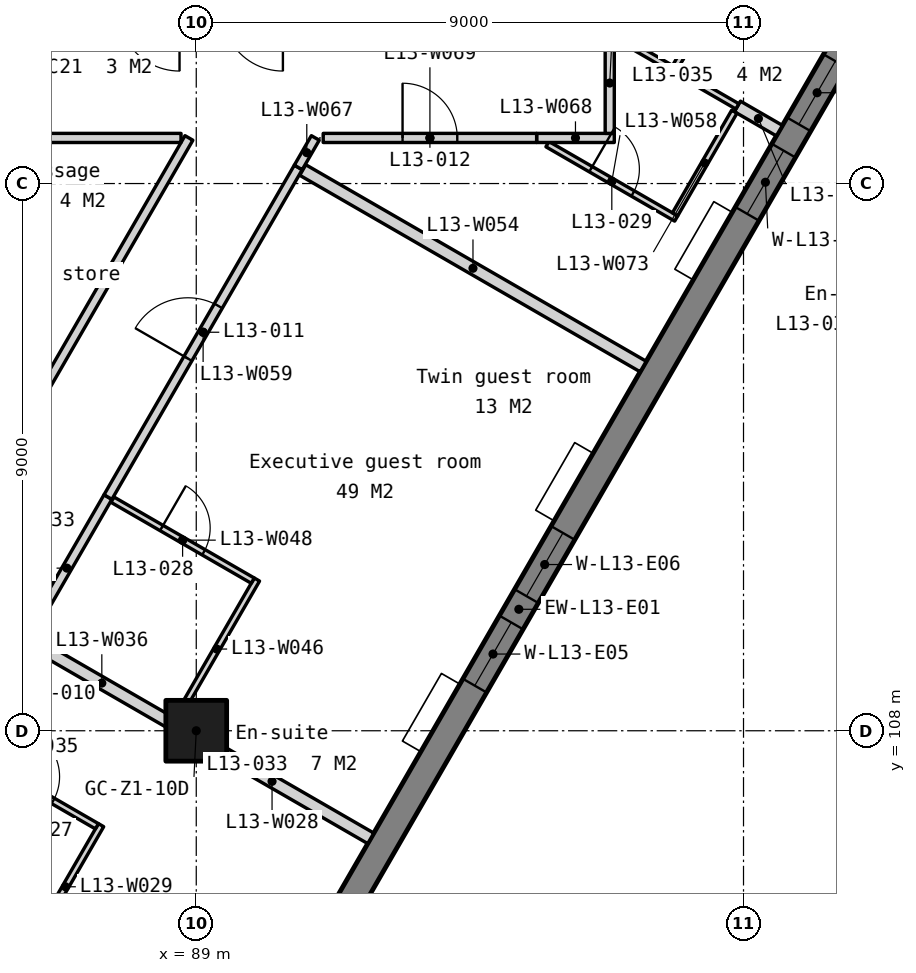
"""IFC4 building model, lengths in metres.
Left out: names, types, materials, properties, quantities, classifications, styles, units other than length and angle.
Written with IfcOpenShell. Run it as: python <this file> out.ifc"""

import sys

from ifc_helpers import new_model, si_unit, direction, frame, frame_2d, origin, origin_2d, place, context, subcontext, project, spatial, polyline, rectangle, outline, extrude, element, fill, save


model = new_model("IFC4")
c1 = context("Model", 3, precision=1e-05, world=origin(), true_north=direction((0.0, 1.0)))
c2 = subcontext(c1, "Body", "Model", "MODEL_VIEW")
j1 = project(units=[si_unit("LENGTHUNIT", "METRE"), si_unit("PLANEANGLEUNIT", "RADIAN")], contexts=[c1])
p1 = place(None, origin())
s1 = spatial("IfcSite", under=j1, at=p1, CompositionType="ELEMENT")
p2 = place(p1, origin())
s2 = spatial("IfcBuilding", under=s1, at=p2, CompositionType="ELEMENT")
p3 = place(p2, frame((0.0, 0.0, 59.5)))
s3 = spatial("IfcBuildingStorey", under=s2, at=p3, CompositionType="ELEMENT", Elevation=59.5)
p4 = place(p3, frame((89.0, 108.0, 0.0), z_axis=(0.0, 0.0, 1.0), x_axis=(1.0, 0.0, 0.0)))
e1 = element("IfcColumn", 1, at=p4, inside=s3, PredefinedType="COLUMN", context=c2, shape_type="SweptSolid", body=[
    extrude(rectangle(XDim=1.0, YDim=1.0, at=origin_2d()), origin(), (0.0, 0.0, 1.0), 3.5),
])
p5 = place(p3, frame((83.105, 90.599, -0.15), z_axis=(0.0, 0.0, 1.0), x_axis=(0.499999201451, 0.866025864826, 0.0)))
e2 = element("IfcWall", 2, at=p5, inside=s3, PredefinedType="SOLIDWALL", context=c2, shape_type="SweptSolid", body=[
    extrude(outline(polyline([(44.8, 0.0), (44.8, 3.5), (0.0, 3.5), (0.0, 0.0), (44.8, 0.0)])), frame((0.0, 0.225, 0.0), z_axis=(0.0, -1.0, 0.0), x_axis=(1.0, 0.0, 0.0)), (0.0, 0.0, 1.0), 0.45),
])
p6 = place(p5, frame((3.03, 0.0, 1.05)))
e3 = element("IfcOpeningElement", 3, at=p6, cuts=e2, PredefinedType="OPENING", context=c2, shape_type="SweptSolid", body=[
    extrude(rectangle(XDim=1.2, YDim=1.5, at=frame_2d((0.6, 0.75))), frame((0.0, 0.235, 0.0), z_axis=(0.0, -1.0, 0.0), x_axis=(1.0, 0.0, 0.0)), (0.0, 0.0, 1.0), 0.47),
])
p7 = place(p5, frame((4.73, 0.0, 1.05)))
e4 = element("IfcOpeningElement", 4, at=p7, cuts=e2, PredefinedType="OPENING", context=c2, shape_type="SweptSolid", body=[
    extrude(rectangle(XDim=1.2, YDim=1.5, at=frame_2d((0.6, 0.75))), frame((0.0, 0.235, 0.0), z_axis=(0.0, -1.0, 0.0), x_axis=(1.0, 0.0, 0.0)), (0.0, 0.0, 1.0), 0.47),
])
p8 = place(p5, frame((11.99, 0.0, 1.05)))
e5 = element("IfcOpeningElement", 5, at=p8, cuts=e2, PredefinedType="OPENING", context=c2, shape_type="SweptSolid", body=[
    extrude(rectangle(XDim=1.2, YDim=1.5, at=frame_2d((0.6, 0.75))), frame((0.0, 0.235, 0.0), z_axis=(0.0, -1.0, 0.0), x_axis=(1.0, 0.0, 0.0)), (0.0, 0.0, 1.0), 0.47),
])
p9 = place(p5, frame((13.69, 0.0, 1.05)))
e6 = element("IfcOpeningElement", 6, at=p9, cuts=e2, PredefinedType="OPENING", context=c2, shape_type="SweptSolid", body=[
    extrude(rectangle(XDim=1.2, YDim=1.5, at=frame_2d((0.6, 0.75))), frame((0.0, 0.235, 0.0), z_axis=(0.0, -1.0, 0.0), x_axis=(1.0, 0.0, 0.0)), (0.0, 0.0, 1.0), 0.47),
])
p10 = place(p5, frame((20.95, 0.0, 1.05)))
e7 = element("IfcOpeningElement", 7, at=p10, cuts=e2, PredefinedType="OPENING", context=c2, shape_type="SweptSolid", body=[
    extrude(rectangle(XDim=1.2, YDim=1.5, at=frame_2d((0.6, 0.75))), frame((0.0, 0.235, 0.0), z_axis=(0.0, -1.0, 0.0), x_axis=(1.0, 0.0, 0.0)), (0.0, 0.0, 1.0), 0.47),
])
p11 = place(p5, frame((22.65, 0.0, 1.05)))
e8 = element("IfcOpeningElement", 8, at=p11, cuts=e2, PredefinedType="OPENING", context=c2, shape_type="SweptSolid", body=[
    extrude(rectangle(XDim=1.2, YDim=1.5, at=frame_2d((0.6, 0.75))), frame((0.0, 0.235, 0.0), z_axis=(0.0, -1.0, 0.0), x_axis=(1.0, 0.0, 0.0)), (0.0, 0.0, 1.0), 0.47),
])
p12 = place(p5, frame((29.91, 0.0, 1.05)))
e9 = element("IfcOpeningElement", 9, at=p12, cuts=e2, PredefinedType="OPENING", context=c2, shape_type="SweptSolid", body=[
    extrude(rectangle(XDim=1.2, YDim=1.5, at=frame_2d((0.6, 0.75))), frame((0.0, 0.235, 0.0), z_axis=(0.0, -1.0, 0.0), x_axis=(1.0, 0.0, 0.0)), (0.0, 0.0, 1.0), 0.47),
])
p13 = place(p5, frame((31.61, 0.0, 1.05)))
e10 = element("IfcOpeningElement", 10, at=p13, cuts=e2, PredefinedType="OPENING", context=c2, shape_type="SweptSolid", body=[
    extrude(rectangle(XDim=1.2, YDim=1.5, at=frame_2d((0.6, 0.75))), frame((0.0, 0.235, 0.0), z_axis=(0.0, -1.0, 0.0), x_axis=(1.0, 0.0, 0.0)), (0.0, 0.0, 1.0), 0.47),
])
p14 = place(p5, frame((38.87, 0.0, 1.05)))
e11 = element("IfcOpeningElement", 11, at=p14, cuts=e2, PredefinedType="OPENING", context=c2, shape_type="SweptSolid", body=[
    extrude(rectangle(XDim=1.2, YDim=1.5, at=frame_2d((0.6, 0.75))), frame((0.0, 0.235, 0.0), z_axis=(0.0, -1.0, 0.0), x_axis=(1.0, 0.0, 0.0)), (0.0, 0.0, 1.0), 0.47),
])
p15 = place(p5, frame((40.57, 0.0, 1.05)))
e12 = element("IfcOpeningElement", 12, at=p15, cuts=e2, PredefinedType="OPENING", context=c2, shape_type="SweptSolid", body=[
    extrude(rectangle(XDim=1.2, YDim=1.5, at=frame_2d((0.6, 0.75))), frame((0.0, 0.235, 0.0), z_axis=(0.0, -1.0, 0.0), x_axis=(1.0, 0.0, 0.0)), (0.0, 0.0, 1.0), 0.47),
])
p16 = place(p3, frame((84.031, 105.583, 0.0), z_axis=(0.0, 0.0, 1.0), x_axis=(0.866015162859, -0.500017737384, 0.0)))
e13 = element("IfcWall", 13, at=p16, inside=s3, PredefinedType="PARTITIONING", context=c2, shape_type="SweptSolid", body=[
    extrude(rectangle(XDim=6.465, YDim=0.2, at=frame_2d((3.232, 0.0))), origin(), (0.0, 0.0, 1.0), 3.35),
])
p17 = place(p3, frame((88.623, 108.105, 0.0), z_axis=(0.0, 0.0, 1.0), x_axis=(0.866022959057, -0.500004234368, 0.0)))
e14 = element("IfcWall", 14, at=p17, inside=s3, PredefinedType="PARTITIONING", context=c2, shape_type="SweptSolid", body=[
    extrude(rectangle(XDim=3.75, YDim=0.2, at=frame_2d((1.875, 0.0))), origin(), (0.0, 0.0, 1.0), 3.35),
])
p18 = place(p3, frame((86.264, 104.421, 0.0), z_axis=(0.0, 0.0, 1.0), x_axis=(0.500032503492, 0.866006637072, 0.0)))
e15 = element("IfcWall", 15, at=p18, inside=s3, PredefinedType="PARTITIONING", context=c2, shape_type="SweptSolid", body=[
    extrude(rectangle(XDim=2.34, YDim=0.1, at=frame_2d((1.17, 0.0))), origin(), (0.0, 0.0, 1.0), 3.35),
])
p19 = place(p3, frame((82.601, 106.875, 0.0), z_axis=(0.0, 0.0, 1.0), x_axis=(0.499995104884, 0.866028229963, 0.0)))
e16 = element("IfcWall", 16, at=p19, inside=s3, PredefinedType="PARTITIONING", context=c2, shape_type="SweptSolid", body=[
    extrude(rectangle(XDim=12.557, YDim=0.15, at=frame_2d((6.278, 0.0))), origin(), (0.0, 0.0, 1.0), 3.35),
])
p20 = place(p19, frame((5.828, 0.0, 0.0)))
e17 = element("IfcOpeningElement", 17, at=p20, cuts=e16, PredefinedType="OPENING", context=c2, shape_type="SweptSolid", body=[
    extrude(rectangle(XDim=0.9, YDim=2.1, at=frame_2d((0.45, 1.05))), frame((0.0, 0.085, 0.0), z_axis=(0.0, -1.0, 0.0), x_axis=(1.0, 0.0, 0.0)), (0.0, 0.0, 1.0), 0.17),
])
p21 = place(p3, frame((85.231, 107.662, 0.0), z_axis=(0.0, 0.0, 1.0), x_axis=(0.866040446274, -0.499973944738, 0.0)))
e18 = element("IfcWall", 18, at=p21, inside=s3, PredefinedType="PARTITIONING", context=c2, shape_type="SweptSolid", body=[
    extrude(rectangle(XDim=2.465, YDim=0.1, at=frame_2d((1.232, 0.0))), origin(), (0.0, 0.0, 1.0), 3.35),
])
p22 = place(p21, frame((0.833, 0.0, 0.0)))
e19 = element("IfcOpeningElement", 19, at=p22, cuts=e18, PredefinedType="OPENING", context=c2, shape_type="SweptSolid", body=[
    extrude(rectangle(XDim=0.8, YDim=2.1, at=frame_2d((0.4, 1.05))), frame((0.0, 0.06, 0.0), z_axis=(0.0, -1.0, 0.0), x_axis=(1.0, 0.0, 0.0)), (0.0, 0.0, 1.0), 0.12),
])
p23 = place(p3, frame((86.271, 109.463, 0.0), z_axis=(0.0, 0.0, 1.0), x_axis=(0.866043331744, -0.499968946578, 0.0)))
e20 = element("IfcWall", 20, at=p23, inside=s3, PredefinedType="PARTITIONING", context=c2, shape_type="SweptSolid", body=[
    extrude(rectangle(XDim=2.715, YDim=0.2, at=frame_2d((1.357, 0.0))), origin(), (0.0, 0.0, 1.0), 3.35),
])
p24 = place(p3, frame((86.198, 109.505, 0.0), z_axis=(0.0, 0.0, 1.0), x_axis=(0.50000943426, 0.866019956843, 0.0)))
e21 = element("IfcWall", 21, at=p24, inside=s3, PredefinedType="PARTITIONING", context=c2, shape_type="SweptSolid", body=[
    extrude(rectangle(XDim=2.7, YDim=0.15, at=frame_2d((1.35, 0.0))), origin(), (0.0, 0.0, 1.0), 3.35),
])
p25 = place(p3, frame((88.678, 108.201, 0.0), z_axis=(0.0, 0.0, 1.0), x_axis=(0.500007957085, 0.86602080971, 0.0)))
e22 = element("IfcWall", 22, at=p25, inside=s3, PredefinedType="PARTITIONING", context=c2, shape_type="SweptSolid", body=[
    extrude(rectangle(XDim=2.64, YDim=0.1, at=frame_2d((1.32, 0.0))), origin(), (0.0, 0.0, 1.0), 3.35),
])
p26 = place(p3, frame((87.621, 111.801, 0.0), z_axis=(0.0, 0.0, 1.0), x_axis=(0.866036091453, -0.499981487958, 0.0)))
e23 = element("IfcWall", 23, at=p26, inside=s3, PredefinedType="PARTITIONING", context=c2, shape_type="SweptSolid", body=[
    extrude(rectangle(XDim=2.665, YDim=0.1, at=frame_2d((1.333, 0.0))), origin(), (0.0, 0.0, 1.0), 3.35),
])
p27 = place(p26, frame((0.933, 0.0, 0.0)))
e24 = element("IfcOpeningElement", 24, at=p27, cuts=e23, PredefinedType="OPENING", context=c2, shape_type="SweptSolid", body=[
    extrude(rectangle(XDim=0.8, YDim=2.1, at=frame_2d((0.4, 1.05))), frame((0.0, 0.06, 0.0), z_axis=(0.0, -1.0, 0.0), x_axis=(1.0, 0.0, 0.0)), (0.0, 0.0, 1.0), 0.12),
])
p28 = place(p3, frame((90.751, 117.223, 0.0), z_axis=(0.0, 0.0, 1.0), x_axis=(0.866015162859, -0.500017737384, 0.0)))
e25 = element("IfcWall", 25, at=p28, inside=s3, PredefinedType="PARTITIONING", context=c2, shape_type="SweptSolid", body=[
    extrude(rectangle(XDim=6.465, YDim=0.2, at=frame_2d((3.232, 0.0))), origin(), (0.0, 0.0, 1.0), 3.35),
])
p29 = place(p3, frame((94.775, 117.647, 0.0), z_axis=(0.0, 0.0, 1.0), x_axis=(0.86604092097, -0.499973122483, 0.0)))
e26 = element("IfcWall", 26, at=p29, inside=s3, PredefinedType="PARTITIONING", context=c2, shape_type="SweptSolid", body=[
    extrude(rectangle(XDim=2.445, YDim=0.1, at=frame_2d((1.223, 0.0))), origin(), (0.0, 0.0, 1.0), 3.35),
])
p30 = place(p29, frame((0.823, 0.0, 0.0)))
e27 = element("IfcOpeningElement", 27, at=p30, cuts=e26, PredefinedType="OPENING", context=c2, shape_type="SweptSolid", body=[
    extrude(rectangle(XDim=0.8, YDim=2.1, at=frame_2d((0.4, 1.05))), frame((0.0, 0.06, 0.0), z_axis=(0.0, -1.0, 0.0), x_axis=(1.0, 0.0, 0.0)), (0.0, 0.0, 1.0), 0.12),
])
p31 = place(p3, frame((87.548, 111.844, 0.0), z_axis=(0.0, 0.0, 1.0), x_axis=(0.499981277565, 0.866036212918, 0.0)))
e28 = element("IfcWall", 28, at=p31, inside=s3, PredefinedType="PARTITIONING", context=c2, shape_type="SweptSolid", body=[
    extrude(rectangle(XDim=6.26, YDim=0.15, at=frame_2d((3.13, 0.0))), origin(), (0.0, 0.0, 1.0), 3.35),
])
p32 = place(p31, frame((2.63, 0.0, 0.0)))
e29 = element("IfcOpeningElement", 29, at=p32, cuts=e28, PredefinedType="OPENING", context=c2, shape_type="SweptSolid", body=[
    extrude(rectangle(XDim=1.0, YDim=2.1, at=frame_2d((0.5, 1.05))), frame((0.0, 0.085, 0.0), z_axis=(0.0, -1.0, 0.0), x_axis=(1.0, 0.0, 0.0)), (0.0, 0.0, 1.0), 0.17),
])
p33 = place(p3, frame((82.601, 117.75, 0.0), z_axis=(0.0, 0.0, 1.0), x_axis=(1.0, 0.0, 0.0)))
e30 = element("IfcWall", 30, at=p33, inside=s3, PredefinedType="PARTITIONING", context=c2, shape_type="SweptSolid", body=[
    extrude(rectangle(XDim=6.148, YDim=0.15, at=frame_2d((3.074, 0.0))), origin(), (0.0, 0.0, 1.0), 3.35),
])
p34 = place(p3, frame((90.678, 117.265, 0.0), z_axis=(0.0, 0.0, 1.0), x_axis=(0.50012503653, 0.865953201874, 0.0)))
e31 = element("IfcWall", 31, at=p34, inside=s3, PredefinedType="PARTITIONING", context=c2, shape_type="SweptSolid", body=[
    extrude(rectangle(XDim=0.56, YDim=0.15, at=frame_2d((0.28, 0.0))), origin(), (0.0, 0.0, 1.0), 3.35),
])
p35 = place(p3, frame((94.598, 117.75, 0.0), z_axis=(0.0, 0.0, 1.0), x_axis=(1.0, 0.0, 0.0)))
e32 = element("IfcWall", 32, at=p35, inside=s3, PredefinedType="PARTITIONING", context=c2, shape_type="SweptSolid", body=[
    extrude(rectangle(XDim=1.277, YDim=0.15, at=frame_2d((0.639, 0.0))), origin(), (0.0, 0.0, 1.0), 3.35),
])
p36 = place(p3, frame((91.088, 117.75, 0.0), z_axis=(0.0, 0.0, 1.0), x_axis=(1.0, 0.0, 0.0)))
e33 = element("IfcWall", 33, at=p36, inside=s3, PredefinedType="PARTITIONING", context=c2, shape_type="SweptSolid", body=[
    extrude(rectangle(XDim=3.51, YDim=0.15, at=frame_2d((1.755, 0.0))), origin(), (0.0, 0.0, 1.0), 3.35),
])
p37 = place(p36, frame((1.305, 0.0, 0.0)))
e34 = element("IfcOpeningElement", 34, at=p37, cuts=e33, PredefinedType="OPENING", context=c2, shape_type="SweptSolid", body=[
    extrude(rectangle(XDim=0.9, YDim=2.1, at=frame_2d((0.45, 1.05))), frame((0.0, 0.085, 0.0), z_axis=(0.0, -1.0, 0.0), x_axis=(1.0, 0.0, 0.0)), (0.0, 0.0, 1.0), 0.17),
])
p38 = place(p3, frame((95.8, 117.825, 0.0), z_axis=(0.0, 0.0, 1.0), x_axis=(0.0, 1.0, 0.0)))
e35 = element("IfcWall", 35, at=p38, inside=s3, PredefinedType="PARTITIONING", context=c2, shape_type="SweptSolid", body=[
    extrude(rectangle(XDim=1.656, YDim=0.15, at=frame_2d((0.828, 0.0))), origin(), (0.0, 0.0, 1.0), 3.35),
])
p39 = place(p3, frame((97.9, 118.269, 0.0), z_axis=(0.0, 0.0, 1.0), x_axis=(0.866068339032, -0.499925626596, 0.0)))
e36 = element("IfcWall", 36, at=p39, inside=s3, PredefinedType="PARTITIONING", context=c2, shape_type="SweptSolid", body=[
    extrude(rectangle(XDim=0.797, YDim=0.2, at=frame_2d((0.399, 0.0))), origin(), (0.0, 0.0, 1.0), 3.35),
])
p40 = place(p3, frame((96.875, 116.493, 0.0), z_axis=(0.0, 0.0, 1.0), x_axis=(0.500043961785, 0.866000020948, 0.0)))
e37 = element("IfcWall", 37, at=p40, inside=s3, PredefinedType="PARTITIONING", context=c2, shape_type="SweptSolid", body=[
    extrude(rectangle(XDim=1.95, YDim=0.1, at=frame_2d((0.975, 0.0))), origin(), (0.0, 0.0, 1.0), 3.35),
])
p41 = place(p3, frame((95.882, 119.433, 0.0), z_axis=(0.0, 0.0, 1.0), x_axis=(0.866009305107, -0.50002788269, 0.0)))
e38 = element("IfcWall", 38, at=p41, inside=s3, PredefinedType="PARTITIONING", context=c2, shape_type="SweptSolid", body=[
    extrude(rectangle(XDim=2.329, YDim=0.1, at=frame_2d((1.165, 0.0))), origin(), (0.0, 0.0, 1.0), 3.35),
])
p42 = place(p3, frame((96.877, 118.917, 0.0), z_axis=(0.0, 0.0, 1.0), x_axis=(0.500001309137, 0.866024647952, 0.0)))
e39 = element("IfcWall", 39, at=p42, inside=s3, PredefinedType="PARTITIONING", context=c2, shape_type="SweptSolid", body=[
    extrude(rectangle(XDim=2.4, YDim=0.1, at=frame_2d((1.2, 0.0))), origin(), (0.0, 0.0, 1.0), 3.35),
])
p43 = place(p10, origin())
e40 = element("IfcWindow", 40, at=p43, inside=s3, PartitioningType="SINGLE_PANEL", PredefinedType="WINDOW", context=c2, shape_type="SweptSolid", body=[
    extrude(rectangle(XDim=1.2, YDim=1.5, at=frame_2d((0.6, 0.75))), frame((0.0, 0.03, 0.0), z_axis=(0.0, -1.0, 0.0), x_axis=(1.0, 0.0, 0.0)), (0.0, 0.0, 1.0), 0.06),
])
fill(e7, e40)
p44 = place(p11, origin())
e41 = element("IfcWindow", 41, at=p44, inside=s3, PartitioningType="SINGLE_PANEL", PredefinedType="WINDOW", context=c2, shape_type="SweptSolid", body=[
    extrude(rectangle(XDim=1.2, YDim=1.5, at=frame_2d((0.6, 0.75))), frame((0.0, 0.03, 0.0), z_axis=(0.0, -1.0, 0.0), x_axis=(1.0, 0.0, 0.0)), (0.0, 0.0, 1.0), 0.06),
])
fill(e8, e41)
p45 = place(p12, origin())
e42 = element("IfcWindow", 42, at=p45, inside=s3, PartitioningType="SINGLE_PANEL", PredefinedType="WINDOW", context=c2, shape_type="SweptSolid", body=[
    extrude(rectangle(XDim=1.2, YDim=1.5, at=frame_2d((0.6, 0.75))), frame((0.0, 0.03, 0.0), z_axis=(0.0, -1.0, 0.0), x_axis=(1.0, 0.0, 0.0)), (0.0, 0.0, 1.0), 0.06),
])
fill(e9, e42)
p46 = place(p13, origin())
e43 = element("IfcWindow", 43, at=p46, inside=s3, PartitioningType="SINGLE_PANEL", PredefinedType="WINDOW", context=c2, shape_type="SweptSolid", body=[
    extrude(rectangle(XDim=1.2, YDim=1.5, at=frame_2d((0.6, 0.75))), frame((0.0, 0.03, 0.0), z_axis=(0.0, -1.0, 0.0), x_axis=(1.0, 0.0, 0.0)), (0.0, 0.0, 1.0), 0.06),
])
fill(e10, e43)
p47 = place(p32, origin())
e44 = element("IfcDoor", 44, at=p47, inside=s3, OperationType="SINGLE_SWING_LEFT", PredefinedType="DOOR", context=c2, shape_type="SweptSolid", body=[
    extrude(rectangle(XDim=1.0, YDim=2.1, at=frame_2d((0.5, 1.05))), frame((0.0, 0.025, 0.0), z_axis=(0.0, -1.0, 0.0), x_axis=(1.0, 0.0, 0.0)), (0.0, 0.0, 1.0), 0.05),
])
fill(e29, e44)
p48 = place(p37, origin())
e45 = element("IfcDoor", 45, at=p48, inside=s3, OperationType="SINGLE_SWING_LEFT", PredefinedType="DOOR", context=c2, shape_type="SweptSolid", body=[
    extrude(rectangle(XDim=0.9, YDim=2.1, at=frame_2d((0.45, 1.05))), frame((0.0, 0.025, 0.0), z_axis=(0.0, -1.0, 0.0), x_axis=(1.0, 0.0, 0.0)), (0.0, 0.0, 1.0), 0.05),
])
fill(e34, e45)
p49 = place(p22, origin())
e46 = element("IfcDoor", 46, at=p49, inside=s3, OperationType="SINGLE_SWING_LEFT", PredefinedType="DOOR", context=c2, shape_type="SweptSolid", body=[
    extrude(rectangle(XDim=0.8, YDim=2.1, at=frame_2d((0.4, 1.05))), frame((0.0, 0.025, 0.0), z_axis=(0.0, -1.0, 0.0), x_axis=(1.0, 0.0, 0.0)), (0.0, 0.0, 1.0), 0.05),
])
fill(e19, e46)
p50 = place(p27, origin())
e47 = element("IfcDoor", 47, at=p50, inside=s3, OperationType="SINGLE_SWING_LEFT", PredefinedType="DOOR", context=c2, shape_type="SweptSolid", body=[
    extrude(rectangle(XDim=0.8, YDim=2.1, at=frame_2d((0.4, 1.05))), frame((0.0, 0.025, 0.0), z_axis=(0.0, -1.0, 0.0), x_axis=(1.0, 0.0, 0.0)), (0.0, 0.0, 1.0), 0.05),
])
fill(e24, e47)
p51 = place(p30, origin())
e48 = element("IfcDoor", 48, at=p51, inside=s3, OperationType="SINGLE_SWING_LEFT", PredefinedType="DOOR", context=c2, shape_type="SweptSolid", body=[
    extrude(rectangle(XDim=0.8, YDim=2.1, at=frame_2d((0.4, 1.05))), frame((0.0, 0.025, 0.0), z_axis=(0.0, -1.0, 0.0), x_axis=(1.0, 0.0, 0.0)), (0.0, 0.0, 1.0), 0.05),
])
fill(e27, e48)
save(model, sys.argv[1])
